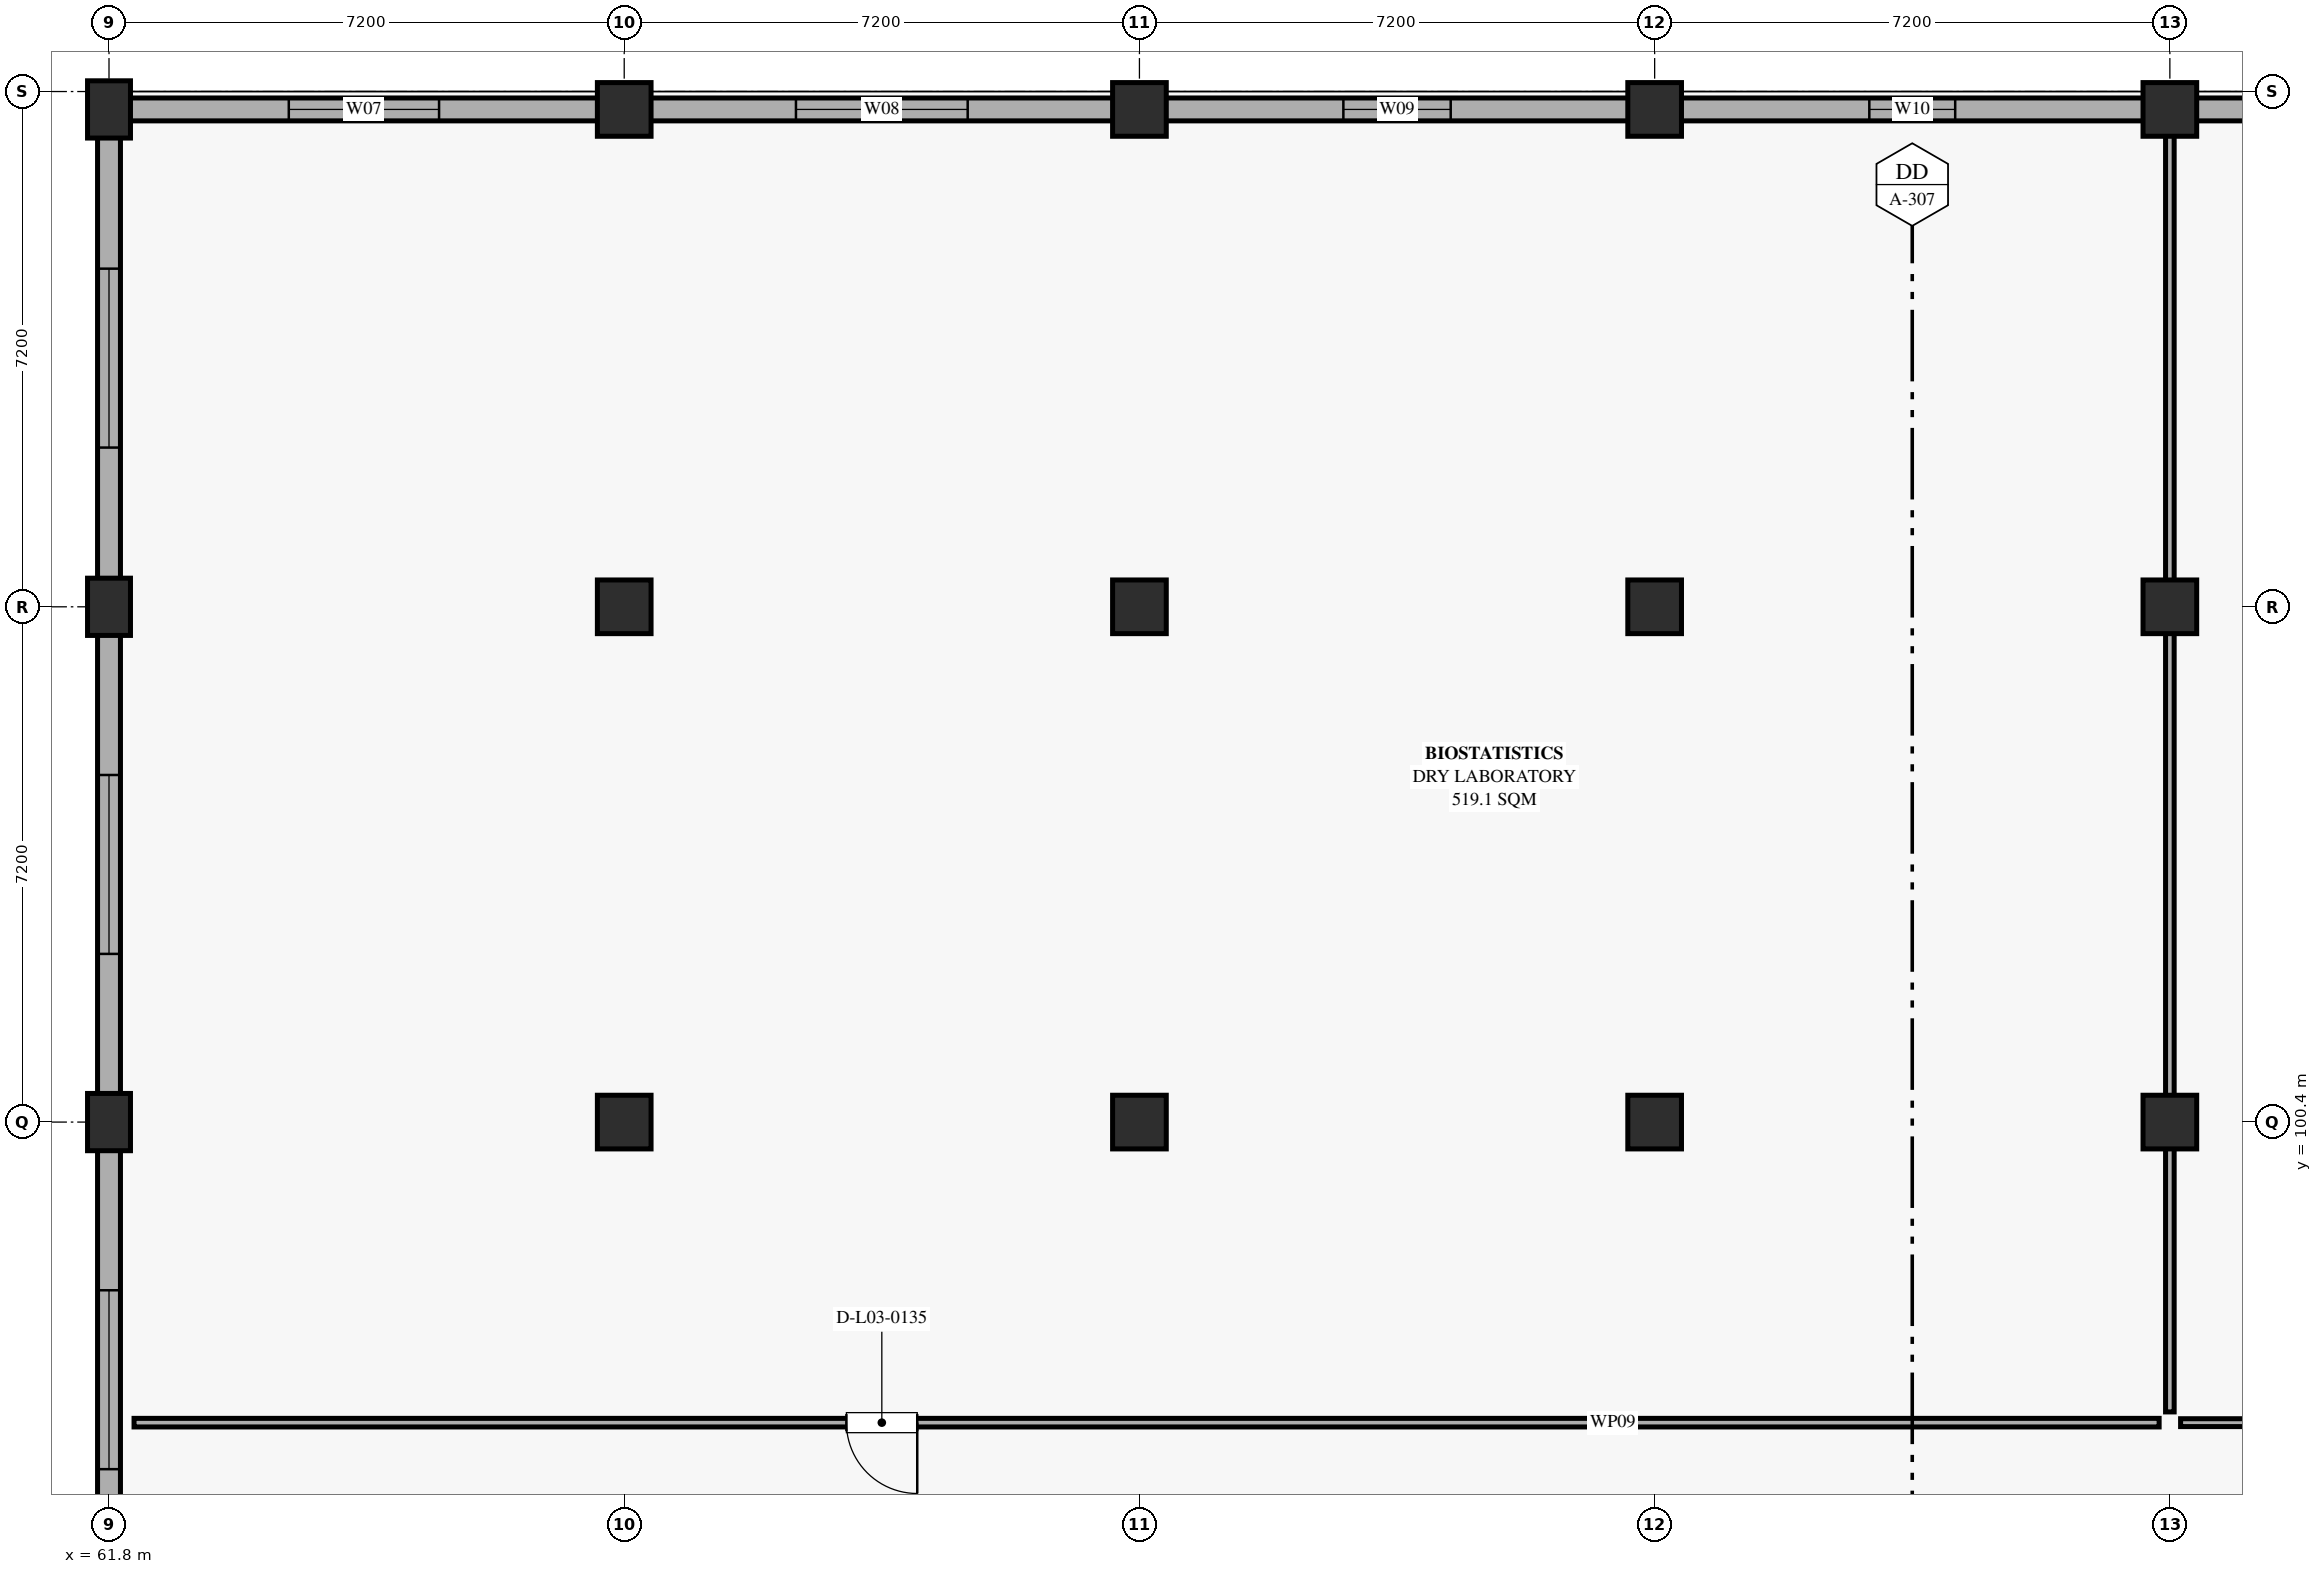
"""IFC4 building model, lengths in metres.
Left out: names, types, materials, properties, quantities, classifications, styles, units other than length and angle.
Written with IfcOpenShell. Run it as: python <this file> out.ifc"""

import sys

from ifc_helpers import new_model, si_unit, direction, frame, frame_2d, origin, origin_2d, place, context, subcontext, project, spatial, rectangle, extrude, element, fill, save


model = new_model("IFC4")
c1 = context("Model", 3, precision=1e-05, world=origin(), true_north=direction((0.0, 1.0)))
c2 = subcontext(c1, "Body", "Model", "MODEL_VIEW")
j1 = project(units=[si_unit("LENGTHUNIT", "METRE"), si_unit("PLANEANGLEUNIT", "RADIAN")], contexts=[c1])
p1 = place(None, origin())
s1 = spatial("IfcSite", under=j1, at=p1, CompositionType="ELEMENT")
p2 = place(p1, origin())
s2 = spatial("IfcBuilding", under=s1, at=p2, CompositionType="ELEMENT")
p3 = place(p2, frame((0.0, 0.0, 15.12)))
s3 = spatial("IfcBuildingStorey", under=s2, at=p3, CompositionType="ELEMENT", Elevation=15.12)
p4 = place(p3, frame((61.8, 100.4, 0.0), z_axis=(0.0, 0.0, 1.0), x_axis=(1.0, 0.0, 0.0)))
e1 = element("IfcColumn", 1, at=p4, inside=s3, PredefinedType="COLUMN", context=c2, shape_type="SweptSolid", body=[
    extrude(rectangle(XDim=0.6, YDim=0.8, at=origin_2d()), origin(), (0.0, 0.0, 1.0), 4.68),
])
for number, where, z_axis, x_axis in (
    (2, (69.0, 100.4, 0.0), (0.0, 0.0, 1.0), (1.0, 0.0, 0.0)),
    (3, (76.2, 100.4, 0.0), (0.0, 0.0, 1.0), (1.0, 0.0, 0.0)),
    (4, (83.4, 100.4, 0.0), (0.0, 0.0, 1.0), (1.0, 0.0, 0.0)),
    (5, (90.6, 100.4, 0.0), (0.0, 0.0, 1.0), (1.0, 0.0, 0.0)),
):
    element("IfcColumn", number, at=place(p3, frame(where, z_axis=z_axis, x_axis=x_axis)), inside=s3, PredefinedType="COLUMN", context=c2, shape_type="SweptSolid", body=[
        extrude(rectangle(XDim=0.75, YDim=0.75, at=origin_2d()), origin(), (0.0, 0.0, 1.0), 4.68),
    ])
p5 = place(p3, frame((61.8, 107.6, 0.0), z_axis=(0.0, 0.0, 1.0), x_axis=(1.0, 0.0, 0.0)))
e6 = element("IfcColumn", 6, at=p5, inside=s3, PredefinedType="COLUMN", context=c2, shape_type="SweptSolid", body=[
    extrude(rectangle(XDim=0.6, YDim=0.8, at=origin_2d()), origin(), (0.0, 0.0, 1.0), 4.68),
])
for number, where, z_axis, x_axis in (
    (7, (69.0, 107.6, 0.0), (0.0, 0.0, 1.0), (1.0, 0.0, 0.0)),
    (8, (76.2, 107.6, 0.0), (0.0, 0.0, 1.0), (1.0, 0.0, 0.0)),
    (9, (83.4, 107.6, 0.0), (0.0, 0.0, 1.0), (1.0, 0.0, 0.0)),
    (10, (90.6, 107.6, 0.0), (0.0, 0.0, 1.0), (1.0, 0.0, 0.0)),
):
    element("IfcColumn", number, at=place(p3, frame(where, z_axis=z_axis, x_axis=x_axis)), inside=s3, PredefinedType="COLUMN", context=c2, shape_type="SweptSolid", body=[
        extrude(rectangle(XDim=0.75, YDim=0.75, at=origin_2d()), origin(), (0.0, 0.0, 1.0), 4.68),
    ])
p6 = place(p3, frame((61.8, 114.55, 0.0), z_axis=(0.0, 0.0, 1.0), x_axis=(1.0, 0.0, 0.0)))
e11 = element("IfcColumn", 11, at=p6, inside=s3, PredefinedType="COLUMN", context=c2, shape_type="SweptSolid", body=[
    extrude(rectangle(XDim=0.6, YDim=0.8, at=origin_2d()), origin(), (0.0, 0.0, 1.0), 4.68),
])
for number, where, z_axis, x_axis in (
    (12, (69.0, 114.55, 0.0), (0.0, 0.0, 1.0), (1.0, 0.0, 0.0)),
    (13, (76.2, 114.55, 0.0), (0.0, 0.0, 1.0), (1.0, 0.0, 0.0)),
    (14, (83.4, 114.55, 0.0), (0.0, 0.0, 1.0), (1.0, 0.0, 0.0)),
    (15, (90.6, 114.55, 0.0), (0.0, 0.0, 1.0), (1.0, 0.0, 0.0)),
):
    element("IfcColumn", number, at=place(p3, frame(where, z_axis=z_axis, x_axis=x_axis)), inside=s3, PredefinedType="COLUMN", context=c2, shape_type="SweptSolid", body=[
        extrude(rectangle(XDim=0.75, YDim=0.75, at=origin_2d()), origin(), (0.0, 0.0, 1.0), 4.68),
    ])
p7 = place(p3, frame((61.8, 93.585, 0.0), z_axis=(0.0, 0.0, 1.0), x_axis=(0.0, 1.0, 0.0)))
e16 = element("IfcWall", 16, at=p7, inside=s3, PredefinedType="SOLIDWALL", context=c2, shape_type="SweptSolid", body=[
    extrude(rectangle(XDim=6.43, YDim=0.32, at=frame_2d((3.215, 0.0))), origin(), (0.0, 0.0, 1.0), 3.18),
])
p8 = place(p7, frame((1.965, 0.0, 0.85)))
e17 = element("IfcOpeningElement", 17, at=p8, cuts=e16, PredefinedType="OPENING", context=c2, shape_type="SweptSolid", body=[
    extrude(rectangle(XDim=2.5, YDim=2.2, at=frame_2d((1.25, 1.1))), frame((0.0, 0.17, 0.0), z_axis=(0.0, -1.0, 0.0), x_axis=(1.0, 0.0, 0.0)), (0.0, 0.0, 1.0), 0.34),
])
p9 = place(p3, frame((61.8, 100.785, 0.0), z_axis=(0.0, 0.0, 1.0), x_axis=(0.0, 1.0, 0.0)))
e18 = element("IfcWall", 18, at=p9, inside=s3, PredefinedType="SOLIDWALL", context=c2, shape_type="SweptSolid", body=[
    extrude(rectangle(XDim=6.43, YDim=0.32, at=frame_2d((3.215, 0.0))), origin(), (0.0, 0.0, 1.0), 3.18),
])
p10 = place(p9, frame((1.965, 0.0, 0.85)))
e19 = element("IfcOpeningElement", 19, at=p10, cuts=e18, PredefinedType="OPENING", context=c2, shape_type="SweptSolid", body=[
    extrude(rectangle(XDim=2.5, YDim=2.2, at=frame_2d((1.25, 1.1))), frame((0.0, 0.17, 0.0), z_axis=(0.0, -1.0, 0.0), x_axis=(1.0, 0.0, 0.0)), (0.0, 0.0, 1.0), 0.34),
])
p11 = place(p3, frame((61.8, 107.985, 0.0), z_axis=(0.0, 0.0, 1.0), x_axis=(0.0, 1.0, 0.0)))
e20 = element("IfcWall", 20, at=p11, inside=s3, PredefinedType="SOLIDWALL", context=c2, shape_type="SweptSolid", body=[
    extrude(rectangle(XDim=6.18, YDim=0.32, at=frame_2d((3.09, 0.0))), origin(), (0.0, 0.0, 1.0), 3.18),
])
p12 = place(p11, frame((1.84, 0.0, 0.85)))
e21 = element("IfcOpeningElement", 21, at=p12, cuts=e20, PredefinedType="OPENING", context=c2, shape_type="SweptSolid", body=[
    extrude(rectangle(XDim=2.5, YDim=2.2, at=frame_2d((1.25, 1.1))), frame((0.0, 0.17, 0.0), z_axis=(0.0, -1.0, 0.0), x_axis=(1.0, 0.0, 0.0)), (0.0, 0.0, 1.0), 0.34),
])
p13 = place(p3, frame((62.085, 114.55, 0.0), z_axis=(0.0, 0.0, 1.0), x_axis=(1.0, 0.0, 0.0)))
e22 = element("IfcWall", 22, at=p13, inside=s3, PredefinedType="SOLIDWALL", context=c2, shape_type="SweptSolid", body=[
    extrude(rectangle(XDim=6.555, YDim=0.32, at=frame_2d((3.277, 0.0))), origin(), (0.0, 0.0, 1.0), 3.18),
])
p14 = place(p13, frame((2.228, 0.0, 0.85)))
e23 = element("IfcOpeningElement", 23, at=p14, cuts=e22, PredefinedType="OPENING", context=c2, shape_type="SweptSolid", body=[
    extrude(rectangle(XDim=2.1, YDim=2.1, at=frame_2d((1.05, 1.05))), frame((0.0, 0.17, 0.0), z_axis=(0.0, -1.0, 0.0), x_axis=(1.0, 0.0, 0.0)), (0.0, 0.0, 1.0), 0.34),
])
p15 = place(p3, frame((69.36, 114.55, 0.0), z_axis=(0.0, 0.0, 1.0), x_axis=(1.0, 0.0, 0.0)))
e24 = element("IfcWall", 24, at=p15, inside=s3, PredefinedType="SOLIDWALL", context=c2, shape_type="SweptSolid", body=[
    extrude(rectangle(XDim=6.48, YDim=0.32, at=frame_2d((3.24, 0.0))), origin(), (0.0, 0.0, 1.0), 3.18),
])
p16 = place(p15, frame((2.04, 0.0, 0.85)))
e25 = element("IfcOpeningElement", 25, at=p16, cuts=e24, PredefinedType="OPENING", context=c2, shape_type="SweptSolid", body=[
    extrude(rectangle(XDim=2.4, YDim=2.1, at=frame_2d((1.2, 1.05))), frame((0.0, 0.17, 0.0), z_axis=(0.0, -1.0, 0.0), x_axis=(1.0, 0.0, 0.0)), (0.0, 0.0, 1.0), 0.34),
])
p17 = place(p3, frame((76.56, 114.55, 0.0), z_axis=(0.0, 0.0, 1.0), x_axis=(1.0, 0.0, 0.0)))
e26 = element("IfcWall", 26, at=p17, inside=s3, PredefinedType="SOLIDWALL", context=c2, shape_type="SweptSolid", body=[
    extrude(rectangle(XDim=6.48, YDim=0.32, at=frame_2d((3.24, 0.0))), origin(), (0.0, 0.0, 1.0), 3.18),
])
p18 = place(p17, frame((2.49, 0.0, 0.85)))
e27 = element("IfcOpeningElement", 27, at=p18, cuts=e26, PredefinedType="OPENING", context=c2, shape_type="SweptSolid", body=[
    extrude(rectangle(XDim=1.5, YDim=2.1, at=frame_2d((0.75, 1.05))), frame((0.0, 0.17, 0.0), z_axis=(0.0, -1.0, 0.0), x_axis=(1.0, 0.0, 0.0)), (0.0, 0.0, 1.0), 0.34),
])
p19 = place(p3, frame((83.76, 114.55, 0.0), z_axis=(0.0, 0.0, 1.0), x_axis=(1.0, 0.0, 0.0)))
e28 = element("IfcWall", 28, at=p19, inside=s3, PredefinedType="SOLIDWALL", context=c2, shape_type="SweptSolid", body=[
    extrude(rectangle(XDim=6.48, YDim=0.32, at=frame_2d((3.24, 0.0))), origin(), (0.0, 0.0, 1.0), 3.18),
])
p20 = place(p19, frame((2.64, 0.0, 0.85)))
e29 = element("IfcOpeningElement", 29, at=p20, cuts=e28, PredefinedType="OPENING", context=c2, shape_type="SweptSolid", body=[
    extrude(rectangle(XDim=1.2, YDim=2.1, at=frame_2d((0.6, 1.05))), frame((0.0, 0.17, 0.0), z_axis=(0.0, -1.0, 0.0), x_axis=(1.0, 0.0, 0.0)), (0.0, 0.0, 1.0), 0.34),
])
p21 = place(p3, frame((90.96, 114.55, 0.0), z_axis=(0.0, 0.0, 1.0), x_axis=(1.0, 0.0, 0.0)))
e30 = element("IfcWall", 30, at=p21, inside=s3, PredefinedType="SOLIDWALL", context=c2, shape_type="SweptSolid", body=[
    extrude(rectangle(XDim=6.48, YDim=0.32, at=frame_2d((3.24, 0.0))), origin(), (0.0, 0.0, 1.0), 3.18),
])
p22 = place(p21, frame((2.34, 0.0, 0.85)))
e31 = element("IfcOpeningElement", 31, at=p22, cuts=e30, PredefinedType="OPENING", context=c2, shape_type="SweptSolid", body=[
    extrude(rectangle(XDim=1.8, YDim=1.8, at=frame_2d((0.9, 0.9))), frame((0.0, 0.17, 0.0), z_axis=(0.0, -1.0, 0.0), x_axis=(1.0, 0.0, 0.0)), (0.0, 0.0, 1.0), 0.34),
])
p23 = place(p3, frame((90.45, 96.2, 0.0), z_axis=(0.0, 0.0, 1.0), x_axis=(-1.0, 0.0, 0.0)))
e32 = element("IfcWall", 32, at=p23, inside=s3, PredefinedType="PARTITIONING", context=c2, shape_type="SweptSolid", body=[
    extrude(rectangle(XDim=28.3, YDim=0.12, at=frame_2d((14.15, 0.0))), origin(), (0.0, 0.0, 1.0), 3.16),
])
p24 = place(p23, frame((17.355, 0.0, 0.0)))
e33 = element("IfcOpeningElement", 33, at=p24, cuts=e32, PredefinedType="OPENING", context=c2, shape_type="SweptSolid", body=[
    extrude(rectangle(XDim=0.99, YDim=2.05, at=frame_2d((0.495, 1.025))), frame((0.0, 0.07, 0.0), z_axis=(0.0, -1.0, 0.0), x_axis=(1.0, 0.0, 0.0)), (0.0, 0.0, 1.0), 0.14),
])
p25 = place(p3, frame((90.6, 114.2, 0.0), z_axis=(0.0, 0.0, 1.0), x_axis=(0.0, -1.0, 0.0)))
e34 = element("IfcWall", 34, at=p25, inside=s3, PredefinedType="PARTITIONING", context=c2, shape_type="SweptSolid", body=[
    extrude(rectangle(XDim=17.85, YDim=0.12, at=frame_2d((8.925, 0.0))), origin(), (0.0, 0.0, 1.0), 3.16),
])
p26 = place(p3, frame((111.85, 96.2, 0.0), z_axis=(0.0, 0.0, 1.0), x_axis=(-1.0, 0.0, 0.0)))
e35 = element("IfcWall", 35, at=p26, inside=s3, PredefinedType="PARTITIONING", context=c2, shape_type="SweptSolid", body=[
    extrude(rectangle(XDim=21.1, YDim=0.11, at=frame_2d((10.55, 0.0))), origin(), (0.0, 0.0, 1.0), 3.16),
])
p27 = place(p26, frame((9.955, 0.0, 0.0)))
e36 = element("IfcOpeningElement", 36, at=p27, cuts=e35, PredefinedType="OPENING", context=c2, shape_type="SweptSolid", body=[
    extrude(rectangle(XDim=0.99, YDim=2.1, at=frame_2d((0.495, 1.05))), frame((0.0, 0.065, 0.0), z_axis=(0.0, -1.0, 0.0), x_axis=(1.0, 0.0, 0.0)), (0.0, 0.0, 1.0), 0.13),
])
p28 = place(p8, origin())
e37 = element("IfcWindow", 37, at=p28, inside=s3, PartitioningType="DOUBLE_PANEL_VERTICAL", PredefinedType="WINDOW", context=c2, shape_type="SweptSolid", body=[
    extrude(rectangle(XDim=2.5, YDim=2.2, at=frame_2d((1.25, 1.1))), frame((0.0, 0.03, 0.0), z_axis=(0.0, -1.0, 0.0), x_axis=(1.0, 0.0, 0.0)), (0.0, 0.0, 1.0), 0.06),
])
fill(e17, e37)
p29 = place(p10, origin())
e38 = element("IfcWindow", 38, at=p29, inside=s3, PartitioningType="DOUBLE_PANEL_VERTICAL", PredefinedType="WINDOW", context=c2, shape_type="SweptSolid", body=[
    extrude(rectangle(XDim=2.5, YDim=2.2, at=frame_2d((1.25, 1.1))), frame((0.0, 0.03, 0.0), z_axis=(0.0, -1.0, 0.0), x_axis=(1.0, 0.0, 0.0)), (0.0, 0.0, 1.0), 0.06),
])
fill(e19, e38)
p30 = place(p12, origin())
e39 = element("IfcWindow", 39, at=p30, inside=s3, PartitioningType="DOUBLE_PANEL_VERTICAL", PredefinedType="WINDOW", context=c2, shape_type="SweptSolid", body=[
    extrude(rectangle(XDim=2.5, YDim=2.2, at=frame_2d((1.25, 1.1))), frame((0.0, 0.03, 0.0), z_axis=(0.0, -1.0, 0.0), x_axis=(1.0, 0.0, 0.0)), (0.0, 0.0, 1.0), 0.06),
])
fill(e21, e39)
p31 = place(p14, origin())
e40 = element("IfcWindow", 40, at=p31, inside=s3, PartitioningType="DOUBLE_PANEL_VERTICAL", PredefinedType="WINDOW", context=c2, shape_type="SweptSolid", body=[
    extrude(rectangle(XDim=2.1, YDim=2.1, at=frame_2d((1.05, 1.05))), frame((0.0, 0.03, 0.0), z_axis=(0.0, -1.0, 0.0), x_axis=(1.0, 0.0, 0.0)), (0.0, 0.0, 1.0), 0.06),
])
fill(e23, e40)
p32 = place(p16, origin())
e41 = element("IfcWindow", 41, at=p32, inside=s3, PartitioningType="DOUBLE_PANEL_VERTICAL", PredefinedType="WINDOW", context=c2, shape_type="SweptSolid", body=[
    extrude(rectangle(XDim=2.4, YDim=2.1, at=frame_2d((1.2, 1.05))), frame((0.0, 0.03, 0.0), z_axis=(0.0, -1.0, 0.0), x_axis=(1.0, 0.0, 0.0)), (0.0, 0.0, 1.0), 0.06),
])
fill(e25, e41)
p33 = place(p18, origin())
e42 = element("IfcWindow", 42, at=p33, inside=s3, PartitioningType="SINGLE_PANEL", PredefinedType="WINDOW", context=c2, shape_type="SweptSolid", body=[
    extrude(rectangle(XDim=1.5, YDim=2.1, at=frame_2d((0.75, 1.05))), frame((0.0, 0.03, 0.0), z_axis=(0.0, -1.0, 0.0), x_axis=(1.0, 0.0, 0.0)), (0.0, 0.0, 1.0), 0.06),
])
fill(e27, e42)
p34 = place(p20, origin())
e43 = element("IfcWindow", 43, at=p34, inside=s3, PartitioningType="SINGLE_PANEL", PredefinedType="WINDOW", context=c2, shape_type="SweptSolid", body=[
    extrude(rectangle(XDim=1.2, YDim=2.1, at=frame_2d((0.6, 1.05))), frame((0.0, 0.03, 0.0), z_axis=(0.0, -1.0, 0.0), x_axis=(1.0, 0.0, 0.0)), (0.0, 0.0, 1.0), 0.06),
])
fill(e29, e43)
p35 = place(p24, origin())
e44 = element("IfcDoor", 44, at=p35, inside=s3, OperationType="SINGLE_SWING_LEFT", PredefinedType="DOOR", context=c2, shape_type="SweptSolid", body=[
    extrude(rectangle(XDim=0.99, YDim=2.05, at=frame_2d((0.495, 1.025))), frame((0.0, 0.025, 0.0), z_axis=(0.0, -1.0, 0.0), x_axis=(1.0, 0.0, 0.0)), (0.0, 0.0, 1.0), 0.05),
])
fill(e33, e44)
save(model, sys.argv[1])
